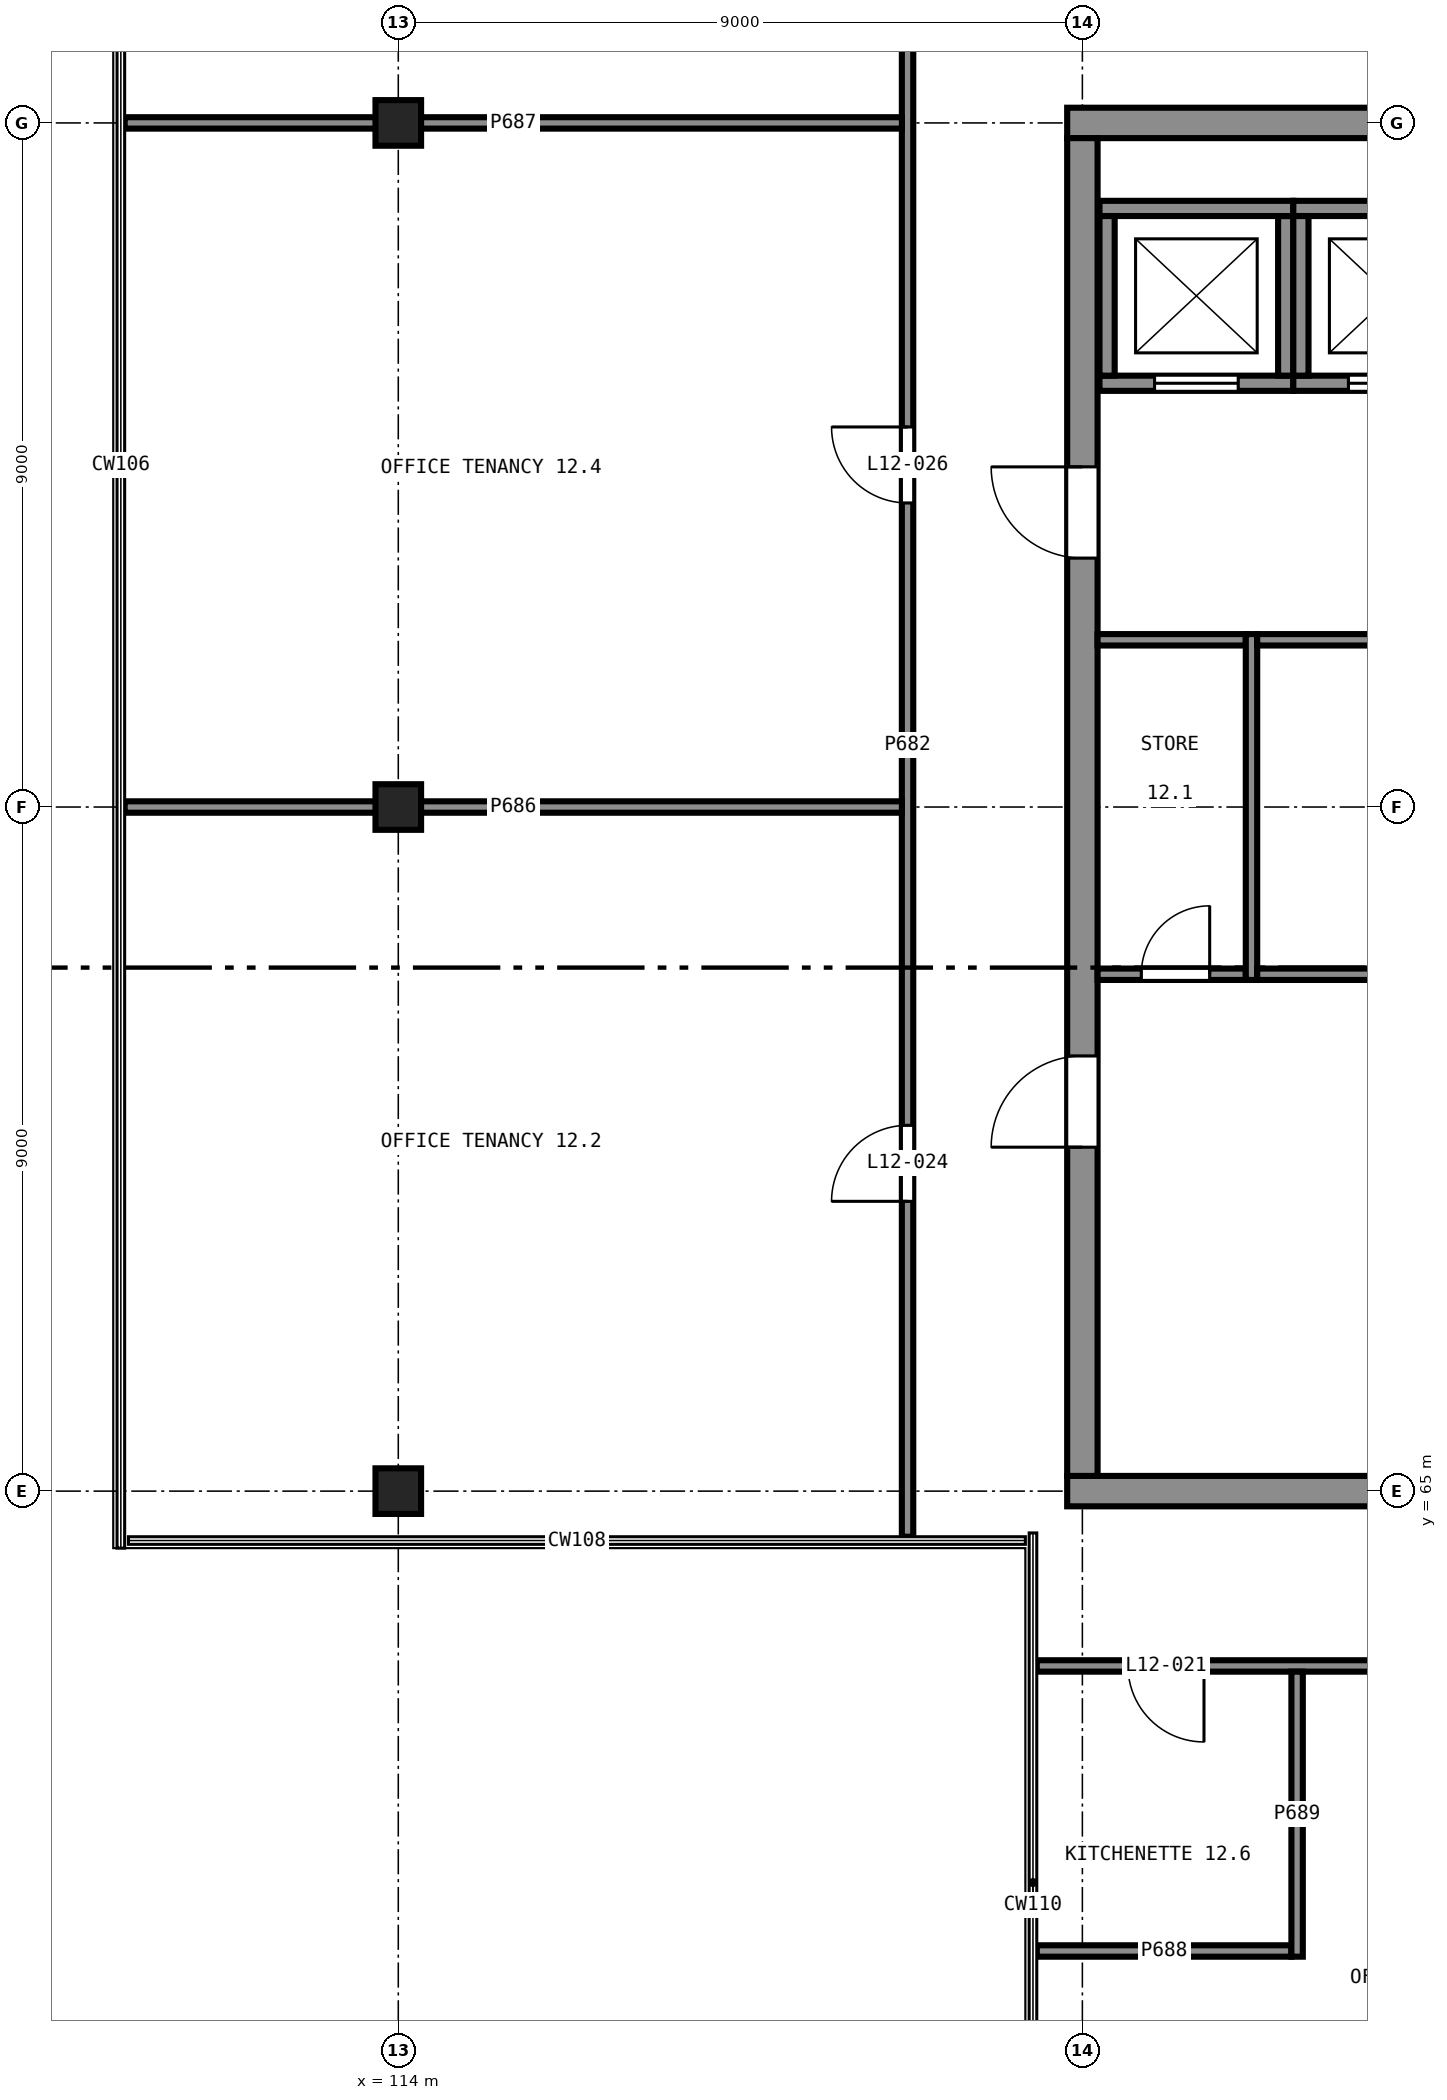
"""IFC4 building model, lengths in metres.
Left out: names, types, materials, properties, quantities, classifications, styles, units other than length and angle.
Written with IfcOpenShell. Run it as: python <this file> out.ifc"""

import sys

from ifc_helpers import new_model, si_unit, direction, frame, frame_2d, origin, origin_2d, place, context, subcontext, project, spatial, rectangle, extrude, element, fill, save


model = new_model("IFC4")
c1 = context("Model", 3, precision=1e-05, world=origin(), true_north=direction((0.0, 1.0)))
c2 = subcontext(c1, "Body", "Model", "MODEL_VIEW")
j1 = project(units=[si_unit("LENGTHUNIT", "METRE"), si_unit("PLANEANGLEUNIT", "RADIAN")], contexts=[c1])
p1 = place(None, origin())
s1 = spatial("IfcSite", under=j1, at=p1, CompositionType="ELEMENT")
p2 = place(p1, origin())
s2 = spatial("IfcBuilding", under=s1, at=p2, CompositionType="ELEMENT")
p3 = place(p2, frame((0.0, 0.0, 49.5)))
s3 = spatial("IfcBuildingStorey", under=s2, at=p3, CompositionType="ELEMENT", Elevation=49.5)
for number, where, z_axis, x_axis in (
    (1, (114.0, 65.0, 0.0), (0.0, 0.0, 1.0), (1.0, 0.0, 0.0)),
    (2, (114.0, 74.0, 0.0), (0.0, 0.0, 1.0), (1.0, 0.0, 0.0)),
    (3, (114.0, 83.0, 0.0), (0.0, 0.0, 1.0), (1.0, 0.0, 0.0)),
):
    element("IfcColumn", number, at=place(p3, frame(where, z_axis=z_axis, x_axis=x_axis)), inside=s3, PredefinedType="COLUMN", context=c2, shape_type="SweptSolid", body=[
        extrude(rectangle(XDim=0.6, YDim=0.6, at=origin_2d()), origin(), (0.0, 0.0, 1.0), 4.0),
    ])
for number, where, z_axis, x_axis in (
    (4, (122.8, 65.0, 0.0), (0.0, 0.0, 1.0), (1.0, 0.0, 0.0)),
    (5, (141.2, 83.0, 0.0), (0.0, 0.0, 1.0), (-1.0, 0.0, 0.0)),
):
    element("IfcWall", number, at=place(p3, frame(where, z_axis=z_axis, x_axis=x_axis)), inside=s3, PredefinedType="SHEAR", context=c2, shape_type="SweptSolid", body=[
        extrude(rectangle(XDim=18.4, YDim=0.4, at=frame_2d((9.2, 0.0))), origin(), (0.0, 0.0, 1.0), 4.0),
    ])
p4 = place(p3, frame((123.0, 82.8, 0.0), z_axis=(0.0, 0.0, 1.0), x_axis=(0.0, -1.0, 0.0)))
e6 = element("IfcWall", 6, at=p4, inside=s3, PredefinedType="SHEAR", context=c2, shape_type="SweptSolid", body=[
    extrude(rectangle(XDim=17.6, YDim=0.4, at=frame_2d((8.8, 0.0))), origin(), (0.0, 0.0, 1.0), 4.0),
])
p5 = place(p4, frame((12.075, 0.0, 0.0)))
e7 = element("IfcOpeningElement", 7, at=p5, cuts=e6, PredefinedType="OPENING", context=c2, shape_type="SweptSolid", body=[
    extrude(rectangle(XDim=1.2, YDim=2.1, at=frame_2d((0.6, 1.05))), frame((0.0, 0.21, 0.0), z_axis=(0.0, -1.0, 0.0), x_axis=(1.0, 0.0, 0.0)), (0.0, 0.0, 1.0), 0.42),
])
p6 = place(p4, frame((4.325, 0.0, 0.0)))
e8 = element("IfcOpeningElement", 8, at=p6, cuts=e6, PredefinedType="OPENING", context=c2, shape_type="SweptSolid", body=[
    extrude(rectangle(XDim=1.2, YDim=2.1, at=frame_2d((0.6, 1.05))), frame((0.0, 0.21, 0.0), z_axis=(0.0, -1.0, 0.0), x_axis=(1.0, 0.0, 0.0)), (0.0, 0.0, 1.0), 0.42),
])
p7 = place(p3, frame((123.225, 79.575, 0.0), z_axis=(0.0, 0.0, 1.0), x_axis=(1.0, 0.0, 0.0)))
e9 = element("IfcWall", 9, at=p7, inside=s3, PredefinedType="SHEAR", context=c2, shape_type="SweptSolid", body=[
    extrude(rectangle(XDim=2.55, YDim=0.2, at=frame_2d((1.275, 0.0))), origin(), (0.0, 0.0, 1.0), 4.0),
])
p8 = place(p7, frame((0.725, 0.0, 0.0)))
e10 = element("IfcOpeningElement", 10, at=p8, cuts=e9, PredefinedType="OPENING", context=c2, shape_type="SweptSolid", body=[
    extrude(rectangle(XDim=1.1, YDim=2.1, at=frame_2d((0.55, 1.05))), frame((0.0, 0.11, 0.0), z_axis=(0.0, -1.0, 0.0), x_axis=(1.0, 0.0, 0.0)), (0.0, 0.0, 1.0), 0.22),
])
p9 = place(p3, frame((125.675, 79.675, 0.0), z_axis=(0.0, 0.0, 1.0), x_axis=(0.0, 1.0, 0.0)))
e11 = element("IfcWall", 11, at=p9, inside=s3, PredefinedType="SHEAR", context=c2, shape_type="SweptSolid", body=[
    extrude(rectangle(XDim=2.1, YDim=0.2, at=frame_2d((1.05, 0.0))), origin(), (0.0, 0.0, 1.0), 4.0),
])
p10 = place(p3, frame((125.775, 81.875, 0.0), z_axis=(0.0, 0.0, 1.0), x_axis=(-1.0, 0.0, 0.0)))
e12 = element("IfcWall", 12, at=p10, inside=s3, PredefinedType="SHEAR", context=c2, shape_type="SweptSolid", body=[
    extrude(rectangle(XDim=2.55, YDim=0.2, at=frame_2d((1.275, 0.0))), origin(), (0.0, 0.0, 1.0), 4.0),
])
p11 = place(p3, frame((123.325, 81.775, 0.0), z_axis=(0.0, 0.0, 1.0), x_axis=(0.0, -1.0, 0.0)))
e13 = element("IfcWall", 13, at=p11, inside=s3, PredefinedType="SHEAR", context=c2, shape_type="SweptSolid", body=[
    extrude(rectangle(XDim=2.1, YDim=0.2, at=frame_2d((1.05, 0.0))), origin(), (0.0, 0.0, 1.0), 4.0),
])
p12 = place(p3, frame((125.775, 79.575, 0.0), z_axis=(0.0, 0.0, 1.0), x_axis=(1.0, 0.0, 0.0)))
e14 = element("IfcWall", 14, at=p12, inside=s3, PredefinedType="SHEAR", context=c2, shape_type="SweptSolid", body=[
    extrude(rectangle(XDim=2.55, YDim=0.2, at=frame_2d((1.275, 0.0))), origin(), (0.0, 0.0, 1.0), 4.0),
])
p13 = place(p12, frame((0.725, 0.0, 0.0)))
e15 = element("IfcOpeningElement", 15, at=p13, cuts=e14, PredefinedType="OPENING", context=c2, shape_type="SweptSolid", body=[
    extrude(rectangle(XDim=1.1, YDim=2.1, at=frame_2d((0.55, 1.05))), frame((0.0, 0.11, 0.0), z_axis=(0.0, -1.0, 0.0), x_axis=(1.0, 0.0, 0.0)), (0.0, 0.0, 1.0), 0.22),
])
p14 = place(p3, frame((128.325, 81.875, 0.0), z_axis=(0.0, 0.0, 1.0), x_axis=(-1.0, 0.0, 0.0)))
e16 = element("IfcWall", 16, at=p14, inside=s3, PredefinedType="SHEAR", context=c2, shape_type="SweptSolid", body=[
    extrude(rectangle(XDim=2.55, YDim=0.2, at=frame_2d((1.275, 0.0))), origin(), (0.0, 0.0, 1.0), 4.0),
])
p15 = place(p3, frame((125.875, 81.775, 0.0), z_axis=(0.0, 0.0, 1.0), x_axis=(0.0, -1.0, 0.0)))
e17 = element("IfcWall", 17, at=p15, inside=s3, PredefinedType="SHEAR", context=c2, shape_type="SweptSolid", body=[
    extrude(rectangle(XDim=2.1, YDim=0.2, at=frame_2d((1.05, 0.0))), origin(), (0.0, 0.0, 1.0), 4.0),
])
p16 = place(p3, frame((125.225, 71.725, 0.0), z_axis=(0.0, 0.0, 1.0), x_axis=(0.0, 1.0, 0.0)))
e18 = element("IfcWall", 18, at=p16, inside=s3, PredefinedType="PARTITIONING", context=c2, shape_type="SweptSolid", body=[
    extrude(rectangle(XDim=4.55, YDim=0.15, at=frame_2d((2.275, 0.0))), origin(), (0.0, 0.0, 1.0), 3.58),
])
p17 = place(p3, frame((123.2, 71.8, 0.0), z_axis=(0.0, 0.0, 1.0), x_axis=(1.0, 0.0, 0.0)))
e19 = element("IfcWall", 19, at=p17, inside=s3, PredefinedType="PARTITIONING", context=c2, shape_type="SweptSolid", body=[
    extrude(rectangle(XDim=1.95, YDim=0.15, at=frame_2d((0.975, 0.0))), origin(), (0.0, 0.0, 1.0), 3.58),
])
p18 = place(p17, frame((0.575, 0.0, 0.0)))
e20 = element("IfcOpeningElement", 20, at=p18, cuts=e19, PredefinedType="OPENING", context=c2, shape_type="SweptSolid", body=[
    extrude(rectangle(XDim=0.9, YDim=2.1, at=frame_2d((0.45, 1.05))), frame((0.0, 0.085, 0.0), z_axis=(0.0, -1.0, 0.0), x_axis=(1.0, 0.0, 0.0)), (0.0, 0.0, 1.0), 0.17),
])
p19 = place(p3, frame((123.2, 76.2, 0.0), z_axis=(0.0, 0.0, 1.0), x_axis=(1.0, 0.0, 0.0)))
e21 = element("IfcWall", 21, at=p19, inside=s3, PredefinedType="PARTITIONING", context=c2, shape_type="SweptSolid", body=[
    extrude(rectangle(XDim=1.95, YDim=0.15, at=frame_2d((0.975, 0.0))), origin(), (0.0, 0.0, 1.0), 3.58),
])
p20 = place(p3, frame((125.3, 71.8, 0.0), z_axis=(0.0, 0.0, 1.0), x_axis=(1.0, 0.0, 0.0)))
e22 = element("IfcWall", 22, at=p20, inside=s3, PredefinedType="PARTITIONING", context=c2, shape_type="SweptSolid", body=[
    extrude(rectangle(XDim=5.35, YDim=0.15, at=frame_2d((2.675, 0.0))), origin(), (0.0, 0.0, 1.0), 3.58),
])
p21 = place(p3, frame((125.3, 76.2, 0.0), z_axis=(0.0, 0.0, 1.0), x_axis=(1.0, 0.0, 0.0)))
e23 = element("IfcWall", 23, at=p21, inside=s3, PredefinedType="PARTITIONING", context=c2, shape_type="SweptSolid", body=[
    extrude(rectangle(XDim=5.35, YDim=0.15, at=frame_2d((2.675, 0.0))), origin(), (0.0, 0.0, 1.0), 3.58),
])
p22 = place(p21, frame((2.225, 0.0, 0.0)))
e24 = element("IfcOpeningElement", 24, at=p22, cuts=e23, PredefinedType="OPENING", context=c2, shape_type="SweptSolid", body=[
    extrude(rectangle(XDim=0.9, YDim=2.1, at=frame_2d((0.45, 1.05))), frame((0.0, 0.085, 0.0), z_axis=(0.0, -1.0, 0.0), x_axis=(1.0, 0.0, 0.0)), (0.0, 0.0, 1.0), 0.17),
])
p23 = place(p3, frame((132.6, 62.7, 0.0), z_axis=(0.0, 0.0, 1.0), x_axis=(-1.0, 0.0, 0.0)))
e25 = element("IfcWall", 25, at=p23, inside=s3, PredefinedType="PARTITIONING", context=c2, shape_type="SweptSolid", body=[
    extrude(rectangle(XDim=10.2, YDim=0.15, at=frame_2d((5.1, 0.0))), origin(), (0.0, 0.0, 1.0), 3.58),
])
p24 = place(p23, frame((8.0, 0.0, 0.0)))
e26 = element("IfcOpeningElement", 26, at=p24, cuts=e25, PredefinedType="OPENING", context=c2, shape_type="SweptSolid", body=[
    extrude(rectangle(XDim=1.0, YDim=2.1, at=frame_2d((0.5, 1.05))), frame((0.0, 0.085, 0.0), z_axis=(0.0, -1.0, 0.0), x_axis=(1.0, 0.0, 0.0)), (0.0, 0.0, 1.0), 0.17),
])
p25 = place(p23, frame((4.465, 0.0, 0.0)))
e27 = element("IfcOpeningElement", 27, at=p25, cuts=e25, PredefinedType="OPENING", context=c2, shape_type="SweptSolid", body=[
    extrude(rectangle(XDim=1.0, YDim=2.1, at=frame_2d((0.5, 1.05))), frame((0.0, 0.085, 0.0), z_axis=(0.0, -1.0, 0.0), x_axis=(1.0, 0.0, 0.0)), (0.0, 0.0, 1.0), 0.17),
])
p26 = place(p3, frame((120.7, 64.4, 0.0), z_axis=(0.0, 0.0, 1.0), x_axis=(0.0, 1.0, 0.0)))
e28 = element("IfcWall", 28, at=p26, inside=s3, PredefinedType="PARTITIONING", context=c2, shape_type="SweptSolid", body=[
    extrude(rectangle(XDim=20.825, YDim=0.15, at=frame_2d((10.413, 0.0))), origin(), (0.0, 0.0, 1.0), 3.58),
])
p27 = place(p26, frame((4.413, 0.0, 0.0)))
e29 = element("IfcOpeningElement", 29, at=p27, cuts=e28, PredefinedType="OPENING", context=c2, shape_type="SweptSolid", body=[
    extrude(rectangle(XDim=1.0, YDim=2.1, at=frame_2d((0.5, 1.05))), frame((0.0, 0.085, 0.0), z_axis=(0.0, -1.0, 0.0), x_axis=(1.0, 0.0, 0.0)), (0.0, 0.0, 1.0), 0.17),
])
p28 = place(p26, frame((13.6, 0.0, 0.0)))
e30 = element("IfcOpeningElement", 30, at=p28, cuts=e28, PredefinedType="OPENING", context=c2, shape_type="SweptSolid", body=[
    extrude(rectangle(XDim=1.0, YDim=2.1, at=frame_2d((0.5, 1.05))), frame((0.0, 0.085, 0.0), z_axis=(0.0, -1.0, 0.0), x_axis=(1.0, 0.0, 0.0)), (0.0, 0.0, 1.0), 0.17),
])
for number, where, z_axis, x_axis in (
    (31, (110.4, 74.0, 0.0), (0.0, 0.0, 1.0), (1.0, 0.0, 0.0)),
    (32, (110.4, 83.0, 0.0), (0.0, 0.0, 1.0), (1.0, 0.0, 0.0)),
):
    element("IfcWall", number, at=place(p3, frame(where, z_axis=z_axis, x_axis=x_axis)), inside=s3, PredefinedType="PARTITIONING", context=c2, shape_type="SweptSolid", body=[
        extrude(rectangle(XDim=10.226, YDim=0.15, at=frame_2d((5.113, 0.0))), origin(), (0.0, 0.0, 1.0), 2.68),
    ])
p29 = place(p3, frame((122.4, 58.95, 0.0), z_axis=(0.0, 0.0, 1.0), x_axis=(1.0, 0.0, 0.0)))
e33 = element("IfcWall", 33, at=p29, inside=s3, PredefinedType="PARTITIONING", context=c2, shape_type="SweptSolid", body=[
    extrude(rectangle(XDim=3.35, YDim=0.15, at=frame_2d((1.675, 0.0))), origin(), (0.0, 0.0, 1.0), 3.58),
])
p30 = place(p3, frame((125.825, 62.625, 0.0), z_axis=(0.0, 0.0, 1.0), x_axis=(0.0, -1.0, 0.0)))
e34 = element("IfcWall", 34, at=p30, inside=s3, PredefinedType="PARTITIONING", context=c2, shape_type="SweptSolid", body=[
    extrude(rectangle(XDim=3.75, YDim=0.15, at=frame_2d((1.875, 0.0))), origin(), (0.0, 0.0, 1.0), 3.58),
])
p31 = place(p8, origin())
e35 = element("IfcDoor", 35, at=p31, inside=s3, OperationType="SLIDING_TO_LEFT", PredefinedType="DOOR", context=c2, shape_type="SweptSolid", body=[
    extrude(rectangle(XDim=1.1, YDim=2.1, at=frame_2d((0.55, 1.05))), frame((0.0, 0.025, 0.0), z_axis=(0.0, -1.0, 0.0), x_axis=(1.0, 0.0, 0.0)), (0.0, 0.0, 1.0), 0.05),
])
fill(e10, e35)
p32 = place(p13, origin())
e36 = element("IfcDoor", 36, at=p32, inside=s3, OperationType="SLIDING_TO_LEFT", PredefinedType="DOOR", context=c2, shape_type="SweptSolid", body=[
    extrude(rectangle(XDim=1.1, YDim=2.1, at=frame_2d((0.55, 1.05))), frame((0.0, 0.025, 0.0), z_axis=(0.0, -1.0, 0.0), x_axis=(1.0, 0.0, 0.0)), (0.0, 0.0, 1.0), 0.05),
])
fill(e15, e36)
p33 = place(p5, frame((1.2, 0.0, 0.0), z_axis=(0.0, 0.0, 1.0), x_axis=(-1.0, 0.0, 0.0)))
e37 = element("IfcDoor", 37, at=p33, inside=s3, OperationType="SINGLE_SWING_RIGHT", PredefinedType="DOOR", context=c2, shape_type="SweptSolid", body=[
    extrude(rectangle(XDim=1.2, YDim=2.1, at=frame_2d((0.6, 1.05))), frame((0.0, 0.025, 0.0), z_axis=(0.0, -1.0, 0.0), x_axis=(1.0, 0.0, 0.0)), (0.0, 0.0, 1.0), 0.05),
])
fill(e7, e37)
p34 = place(p6, frame((1.2, 0.0, 0.0), z_axis=(0.0, 0.0, 1.0), x_axis=(-1.0, 0.0, 0.0)))
e38 = element("IfcDoor", 38, at=p34, inside=s3, OperationType="SINGLE_SWING_LEFT", PredefinedType="DOOR", context=c2, shape_type="SweptSolid", body=[
    extrude(rectangle(XDim=1.2, YDim=2.1, at=frame_2d((0.6, 1.05))), frame((0.0, 0.025, 0.0), z_axis=(0.0, -1.0, 0.0), x_axis=(1.0, 0.0, 0.0)), (0.0, 0.0, 1.0), 0.05),
])
fill(e8, e38)
p35 = place(p18, origin())
e39 = element("IfcDoor", 39, at=p35, inside=s3, OperationType="SINGLE_SWING_LEFT", PredefinedType="DOOR", context=c2, shape_type="SweptSolid", body=[
    extrude(rectangle(XDim=0.9, YDim=2.1, at=frame_2d((0.45, 1.05))), frame((0.0, 0.025, 0.0), z_axis=(0.0, -1.0, 0.0), x_axis=(1.0, 0.0, 0.0)), (0.0, 0.0, 1.0), 0.05),
])
fill(e20, e39)
p36 = place(p24, origin())
e40 = element("IfcDoor", 40, at=p36, inside=s3, OperationType="SINGLE_SWING_RIGHT", PredefinedType="DOOR", context=c2, shape_type="SweptSolid", body=[
    extrude(rectangle(XDim=1.0, YDim=2.1, at=frame_2d((0.5, 1.05))), frame((0.0, 0.025, 0.0), z_axis=(0.0, -1.0, 0.0), x_axis=(1.0, 0.0, 0.0)), (0.0, 0.0, 1.0), 0.05),
])
fill(e26, e40)
p37 = place(p27, origin())
e41 = element("IfcDoor", 41, at=p37, inside=s3, OperationType="SINGLE_SWING_RIGHT", PredefinedType="DOOR", context=c2, shape_type="SweptSolid", body=[
    extrude(rectangle(XDim=1.0, YDim=2.1, at=frame_2d((0.5, 1.05))), frame((0.0, 0.025, 0.0), z_axis=(0.0, -1.0, 0.0), x_axis=(1.0, 0.0, 0.0)), (0.0, 0.0, 1.0), 0.05),
])
fill(e29, e41)
p38 = place(p28, origin())
e42 = element("IfcDoor", 42, at=p38, inside=s3, OperationType="SINGLE_SWING_LEFT", PredefinedType="DOOR", context=c2, shape_type="SweptSolid", body=[
    extrude(rectangle(XDim=1.0, YDim=2.1, at=frame_2d((0.5, 1.05))), frame((0.0, 0.025, 0.0), z_axis=(0.0, -1.0, 0.0), x_axis=(1.0, 0.0, 0.0)), (0.0, 0.0, 1.0), 0.05),
])
fill(e30, e42)
save(model, sys.argv[1])
